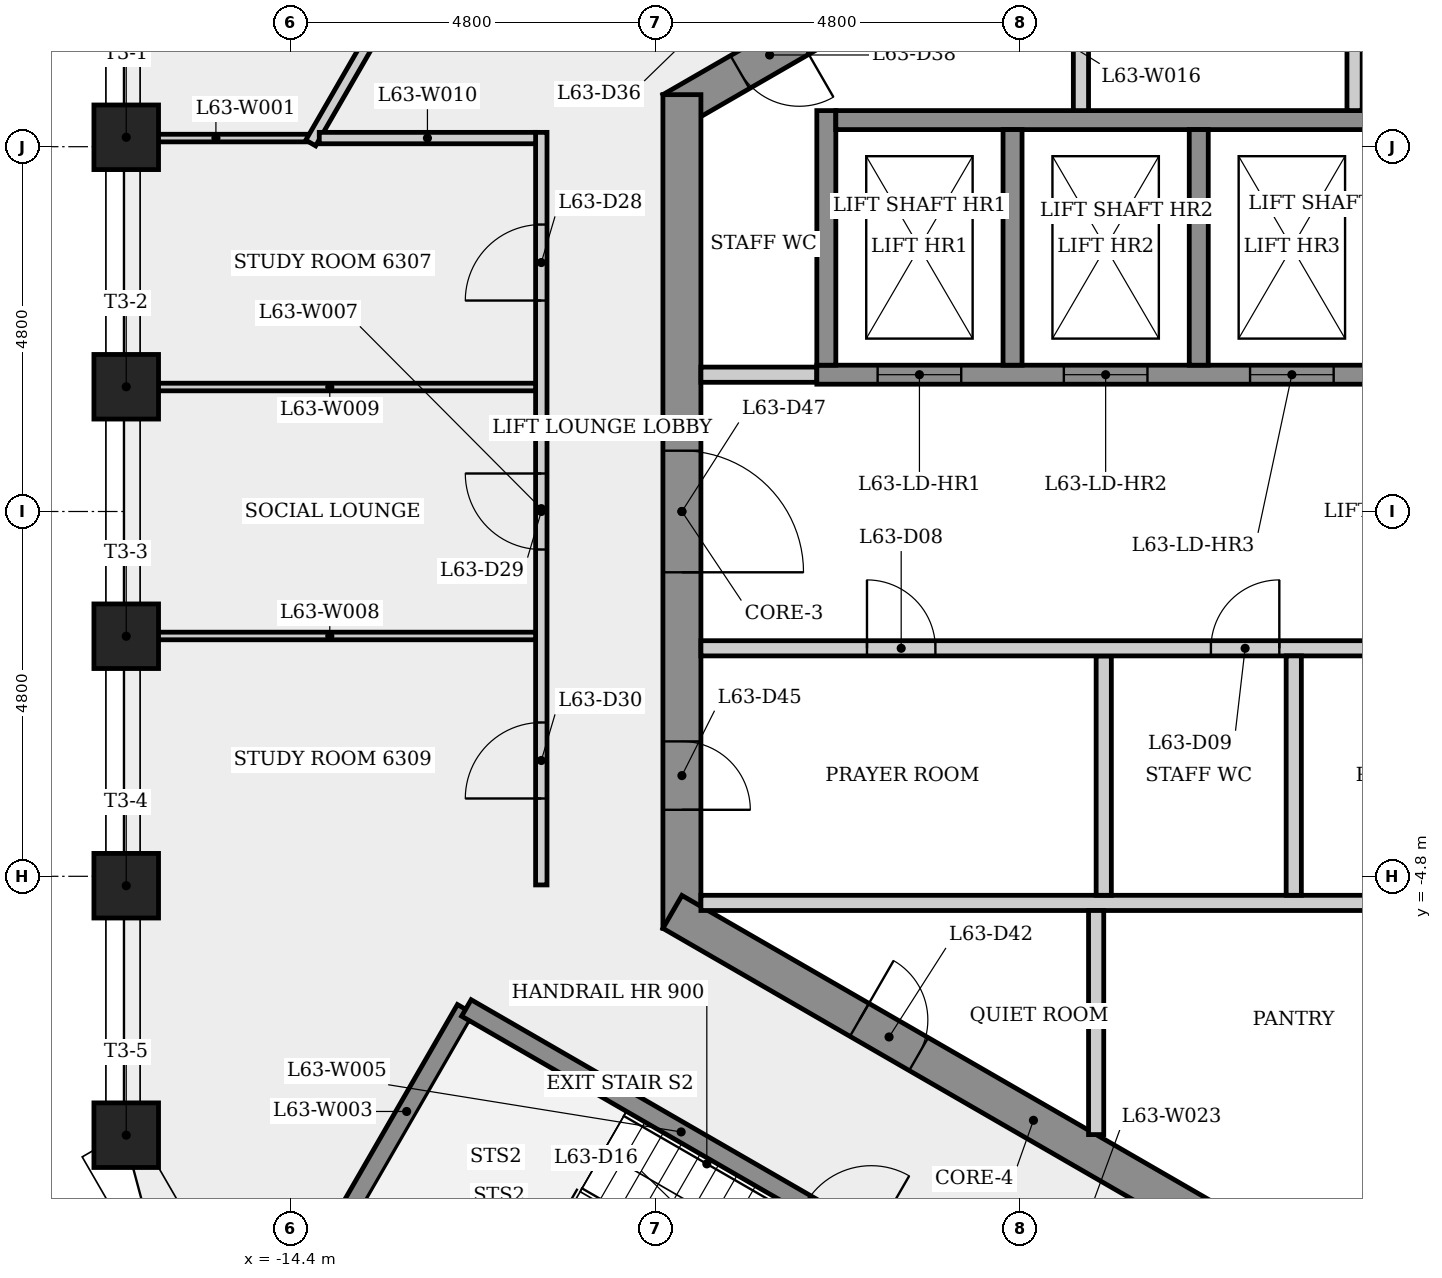
"""IFC4 building model, lengths in metres.
Left out: names, types, materials, properties, quantities, classifications, styles, units other than length and angle.
Written with IfcOpenShell. Run it as: python <this file> out.ifc"""

import sys

from ifc_helpers import new_model, si_unit, direction, frame, frame_2d, origin, origin_2d, place, context, subcontext, project, spatial, rectangle, extrude, element, fill, save


model = new_model("IFC4")
c1 = context("Model", 3, precision=1e-05, world=origin(), true_north=direction((0.0, 1.0)))
c2 = subcontext(c1, "Body", "Model", "MODEL_VIEW")
j1 = project(units=[si_unit("LENGTHUNIT", "METRE"), si_unit("PLANEANGLEUNIT", "RADIAN")], contexts=[c1])
p1 = place(None, origin())
s1 = spatial("IfcSite", under=j1, at=p1, CompositionType="ELEMENT")
p2 = place(p1, origin())
s2 = spatial("IfcBuilding", under=s1, at=p2, CompositionType="ELEMENT")
p3 = place(p2, frame((0.0, 0.0, 235.9)))
s3 = spatial("IfcBuildingStorey", under=s2, at=p3, CompositionType="ELEMENT", Elevation=235.9)
p4 = place(p3, frame((0.125, 10.753, 0.0), z_axis=(0.0, 0.0, 1.0), x_axis=(-0.866023993627, -0.500002442456, 0.0)))
e1 = element("IfcWall", 1, at=p4, inside=s3, PredefinedType="SHEAR", context=c2, shape_type="SweptSolid", body=[
    extrude(rectangle(XDim=10.97, YDim=0.5, at=frame_2d((5.485, 0.0))), origin(), (0.0, 0.0, 1.0), 3.4),
])
p5 = place(p4, frame((9.043, 0.0, 0.0)))
e2 = element("IfcOpeningElement", 2, at=p5, cuts=e1, PredefinedType="OPENING", context=c2, shape_type="SweptSolid", body=[
    extrude(rectangle(XDim=0.9, YDim=2.1, at=frame_2d((0.45, 1.05))), frame((0.0, 0.26, 0.0), z_axis=(0.0, -1.0, 0.0), x_axis=(1.0, 0.0, 0.0)), (0.0, 0.0, 1.0), 0.52),
])
p6 = place(p4, frame((2.38, 0.0, 0.0)))
e3 = element("IfcOpeningElement", 3, at=p6, cuts=e1, PredefinedType="OPENING", context=c2, shape_type="SweptSolid", body=[
    extrude(rectangle(XDim=0.9, YDim=2.1, at=frame_2d((0.45, 1.05))), frame((0.0, 0.26, 0.0), z_axis=(0.0, -1.0, 0.0), x_axis=(1.0, 0.0, 0.0)), (0.0, 0.0, 1.0), 0.52),
])
p7 = place(p3, frame((-9.25, 5.485, 0.0), z_axis=(0.0, 0.0, 1.0), x_axis=(0.0, -1.0, 0.0)))
e4 = element("IfcWall", 4, at=p7, inside=s3, PredefinedType="SHEAR", context=c2, shape_type="SweptSolid", body=[
    extrude(rectangle(XDim=10.97, YDim=0.5, at=frame_2d((5.485, 0.0))), origin(), (0.0, 0.0, 1.0), 3.4),
])
p8 = place(p7, frame((8.51, 0.0, 0.0)))
e5 = element("IfcOpeningElement", 5, at=p8, cuts=e4, PredefinedType="OPENING", context=c2, shape_type="SweptSolid", body=[
    extrude(rectangle(XDim=0.9, YDim=2.1, at=frame_2d((0.45, 1.05))), frame((0.0, 0.26, 0.0), z_axis=(0.0, -1.0, 0.0), x_axis=(1.0, 0.0, 0.0)), (0.0, 0.0, 1.0), 0.52),
])
p9 = place(p7, frame((4.685, 0.0, 0.0)))
e6 = element("IfcOpeningElement", 6, at=p9, cuts=e4, PredefinedType="OPENING", context=c2, shape_type="SweptSolid", body=[
    extrude(rectangle(XDim=1.6, YDim=2.1, at=frame_2d((0.8, 1.05))), frame((0.0, 0.26, 0.0), z_axis=(0.0, -1.0, 0.0), x_axis=(1.0, 0.0, 0.0)), (0.0, 0.0, 1.0), 0.52),
])
p10 = place(p3, frame((-9.375, -5.268, 0.0), z_axis=(0.0, 0.0, 1.0), x_axis=(0.866023993627, -0.500002442456, 0.0)))
e7 = element("IfcWall", 7, at=p10, inside=s3, PredefinedType="SHEAR", context=c2, shape_type="SweptSolid", body=[
    extrude(rectangle(XDim=10.97, YDim=0.5, at=frame_2d((5.485, 0.0))), origin(), (0.0, 0.0, 1.0), 3.4),
])
p11 = place(p10, frame((2.842, 0.0, 0.0)))
e8 = element("IfcOpeningElement", 8, at=p11, cuts=e7, PredefinedType="OPENING", context=c2, shape_type="SweptSolid", body=[
    extrude(rectangle(XDim=0.9, YDim=2.1, at=frame_2d((0.45, 1.05))), frame((0.0, 0.26, 0.0), z_axis=(0.0, -1.0, 0.0), x_axis=(1.0, 0.0, 0.0)), (0.0, 0.0, 1.0), 0.52),
])
for number, where, z_axis, x_axis in (
    (9, (-16.561, 4.924, 0.0), (0.0, 0.0, 1.0), (-1.0, 0.0, 0.0)),
    (10, (-16.561, 1.641, 0.0), (0.0, 0.0, 1.0), (-1.0, 0.0, 0.0)),
    (11, (-16.561, -1.641, 0.0), (0.0, 0.0, 1.0), (-1.0, 0.0, 0.0)),
    (12, (-16.561, -4.924, 0.0), (0.0, 0.0, 1.0), (-1.0, 0.0, 0.0)),
    (13, (-16.561, -8.206, 0.0), (0.0, 0.0, 1.0), (-1.0, 0.0, 0.0)),
):
    element("IfcColumn", number, at=place(p3, frame(where, z_axis=z_axis, x_axis=x_axis)), inside=s3, PredefinedType="COLUMN", context=c2, shape_type="SweptSolid", body=[
        extrude(rectangle(XDim=0.85, YDim=0.85, at=origin_2d()), origin(), (0.0, 0.0, 1.0), 3.4),
    ])
p12 = place(p3, frame((-14.171, 4.914, 0.0), z_axis=(0.0, 0.0, 1.0), x_axis=(-1.0, 0.0, 0.0)))
e14 = element("IfcWall", 14, at=p12, inside=s3, PredefinedType="PARTITIONING", context=c2, shape_type="SweptSolid", body=[
    extrude(rectangle(XDim=2.419, YDim=0.1, at=frame_2d((1.21, 0.0))), origin(), (0.0, 0.0, 1.0), 3.05),
])
p13 = place(p3, frame((-14.134, 4.849, 0.0), z_axis=(0.0, 0.0, 1.0), x_axis=(0.50000114319, 0.866024743763, 0.0)))
e15 = element("IfcWall", 15, at=p13, inside=s3, PredefinedType="PARTITIONING", context=c2, shape_type="SweptSolid", body=[
    extrude(rectangle(XDim=6.092, YDim=0.15, at=frame_2d((3.046, 0.0))), origin(), (0.0, 0.0, 1.0), 3.05),
])
p14 = place(p13, frame((2.546, 0.0, 0.0)))
e16 = element("IfcOpeningElement", 16, at=p14, cuts=e15, PredefinedType="OPENING", context=c2, shape_type="SweptSolid", body=[
    extrude(rectangle(XDim=1.0, YDim=2.1, at=frame_2d((0.5, 1.05))), frame((0.0, 0.085, 0.0), z_axis=(0.0, -1.0, 0.0), x_axis=(1.0, 0.0, 0.0)), (0.0, 0.0, 1.0), 0.17),
])
p15 = place(p3, frame((-13.648, -9.239, 0.0), z_axis=(0.0, 0.0, 1.0), x_axis=(0.500003782172, 0.866023220135, 0.0)))
e17 = element("IfcWall", 17, at=p15, inside=s3, PredefinedType="SHEAR", context=c2, shape_type="SweptSolid", body=[
    extrude(rectangle(XDim=3.105, YDim=0.25, at=frame_2d((1.552, 0.0))), origin(), (0.0, 0.0, 1.0), 3.05),
])
p16 = place(p3, frame((-12.085, -6.532, 0.0), z_axis=(0.0, 0.0, 1.0), x_axis=(0.866031063448, -0.499990197047, 0.0)))
e18 = element("IfcWall", 18, at=p16, inside=s3, PredefinedType="SHEAR", context=c2, shape_type="SweptSolid", body=[
    extrude(rectangle(XDim=6.525, YDim=0.25, at=frame_2d((3.263, 0.0))), origin(), (0.0, 0.0, 1.0), 3.05),
])
p17 = place(p16, frame((5.15, 0.0, 0.0)))
e19 = element("IfcOpeningElement", 19, at=p17, cuts=e18, PredefinedType="OPENING", context=c2, shape_type="SweptSolid", body=[
    extrude(rectangle(XDim=1.0, YDim=2.1, at=frame_2d((0.5, 1.05))), frame((0.0, 0.135, 0.0), z_axis=(0.0, -1.0, 0.0), x_axis=(1.0, 0.0, 0.0)), (0.0, 0.0, 1.0), 0.27),
])
p18 = place(p3, frame((-11.1, -4.914, 0.0), z_axis=(0.0, 0.0, 1.0), x_axis=(0.0, 1.0, 0.0)))
e20 = element("IfcWall", 20, at=p18, inside=s3, PredefinedType="PARTITIONING", context=c2, shape_type="SweptSolid", body=[
    extrude(rectangle(XDim=9.902, YDim=0.15, at=frame_2d((4.951, 0.0))), origin(), (0.0, 0.0, 1.0), 3.05),
])
p19 = place(p18, frame((7.689, 0.0, 0.0)))
e21 = element("IfcOpeningElement", 21, at=p19, cuts=e20, PredefinedType="OPENING", context=c2, shape_type="SweptSolid", body=[
    extrude(rectangle(XDim=1.0, YDim=2.1, at=frame_2d((0.5, 1.05))), frame((0.0, 0.085, 0.0), z_axis=(0.0, -1.0, 0.0), x_axis=(1.0, 0.0, 0.0)), (0.0, 0.0, 1.0), 0.17),
])
p20 = place(p18, frame((4.414, 0.0, 0.0)))
e22 = element("IfcOpeningElement", 22, at=p20, cuts=e20, PredefinedType="OPENING", context=c2, shape_type="SweptSolid", body=[
    extrude(rectangle(XDim=1.0, YDim=2.1, at=frame_2d((0.5, 1.05))), frame((0.0, 0.085, 0.0), z_axis=(0.0, -1.0, 0.0), x_axis=(1.0, 0.0, 0.0)), (0.0, 0.0, 1.0), 0.17),
])
p21 = place(p18, frame((1.137, 0.0, 0.0)))
e23 = element("IfcOpeningElement", 23, at=p21, cuts=e20, PredefinedType="OPENING", context=c2, shape_type="SweptSolid", body=[
    extrude(rectangle(XDim=1.0, YDim=2.1, at=frame_2d((0.5, 1.05))), frame((0.0, 0.085, 0.0), z_axis=(0.0, -1.0, 0.0), x_axis=(1.0, 0.0, 0.0)), (0.0, 0.0, 1.0), 0.17),
])
for number, where, z_axis, x_axis in (
    (24, (-11.175, -1.638, 0.0), (0.0, 0.0, 1.0), (-1.0, 0.0, 0.0)),
    (25, (-11.175, 1.638, 0.0), (0.0, 0.0, 1.0), (-1.0, 0.0, 0.0)),
):
    element("IfcWall", number, at=place(p3, frame(where, z_axis=z_axis, x_axis=x_axis)), inside=s3, PredefinedType="PARTITIONING", context=c2, shape_type="SweptSolid", body=[
        extrude(rectangle(XDim=5.416, YDim=0.1, at=frame_2d((2.708, 0.0))), origin(), (0.0, 0.0, 1.0), 3.05),
    ])
p22 = place(p3, frame((-11.175, 4.914, 0.0), z_axis=(0.0, 0.0, 1.0), x_axis=(-1.0, 0.0, 0.0)))
e26 = element("IfcWall", 26, at=p22, inside=s3, PredefinedType="PARTITIONING", context=c2, shape_type="SweptSolid", body=[
    extrude(rectangle(XDim=2.846, YDim=0.15, at=frame_2d((1.423, 0.0))), origin(), (0.0, 0.0, 1.0), 3.05),
])
p23 = place(p3, frame((-9.0, 1.8, 0.0), z_axis=(0.0, 0.0, 1.0), x_axis=(1.0, 0.0, 0.0)))
e27 = element("IfcWall", 27, at=p23, inside=s3, PredefinedType="PARTITIONING", context=c2, shape_type="SweptSolid", body=[
    extrude(rectangle(XDim=1.525, YDim=0.2, at=frame_2d((0.763, 0.0))), origin(), (0.0, 0.0, 1.0), 3.05),
])
p24 = place(p3, frame((-9.0, -5.15, 0.0), z_axis=(0.0, 0.0, 1.0), x_axis=(1.0, 0.0, 0.0)))
e28 = element("IfcWall", 28, at=p24, inside=s3, PredefinedType="PARTITIONING", context=c2, shape_type="SweptSolid", body=[
    extrude(rectangle(XDim=11.325, YDim=0.2, at=frame_2d((5.663, 0.0))), origin(), (0.0, 0.0, 1.0), 3.05),
])
p25 = place(p3, frame((-7.475, 1.8, 0.0), z_axis=(0.0, 0.0, 1.0), x_axis=(1.0, 0.0, 0.0)))
e29 = element("IfcWall", 29, at=p25, inside=s3, PredefinedType="SHEAR", context=c2, shape_type="SweptSolid", body=[
    extrude(rectangle(XDim=14.95, YDim=0.25, at=frame_2d((7.475, 0.0))), origin(), (0.0, 0.0, 1.0), 3.05),
])
p26 = place(p25, frame((0.8, 0.0, 0.0)))
e30 = element("IfcOpeningElement", 30, at=p26, cuts=e29, PredefinedType="OPENING", context=c2, shape_type="SweptSolid", body=[
    extrude(rectangle(XDim=1.1, YDim=2.1, at=frame_2d((0.55, 1.05))), frame((0.0, 0.135, 0.0), z_axis=(0.0, -1.0, 0.0), x_axis=(1.0, 0.0, 0.0)), (0.0, 0.0, 1.0), 0.27),
])
p27 = place(p25, frame((3.25, 0.0, 0.0)))
e31 = element("IfcOpeningElement", 31, at=p27, cuts=e29, PredefinedType="OPENING", context=c2, shape_type="SweptSolid", body=[
    extrude(rectangle(XDim=1.1, YDim=2.1, at=frame_2d((0.55, 1.05))), frame((0.0, 0.135, 0.0), z_axis=(0.0, -1.0, 0.0), x_axis=(1.0, 0.0, 0.0)), (0.0, 0.0, 1.0), 0.27),
])
p28 = place(p25, frame((5.7, 0.0, 0.0)))
e32 = element("IfcOpeningElement", 32, at=p28, cuts=e29, PredefinedType="OPENING", context=c2, shape_type="SweptSolid", body=[
    extrude(rectangle(XDim=1.1, YDim=2.1, at=frame_2d((0.55, 1.05))), frame((0.0, 0.135, 0.0), z_axis=(0.0, -1.0, 0.0), x_axis=(1.0, 0.0, 0.0)), (0.0, 0.0, 1.0), 0.27),
])
p29 = place(p25, frame((8.15, 0.0, 0.0)))
e33 = element("IfcOpeningElement", 33, at=p29, cuts=e29, PredefinedType="OPENING", context=c2, shape_type="SweptSolid", body=[
    extrude(rectangle(XDim=1.1, YDim=2.1, at=frame_2d((0.55, 1.05))), frame((0.0, 0.135, 0.0), z_axis=(0.0, -1.0, 0.0), x_axis=(1.0, 0.0, 0.0)), (0.0, 0.0, 1.0), 0.27),
])
p30 = place(p25, frame((10.6, 0.0, 0.0)))
e34 = element("IfcOpeningElement", 34, at=p30, cuts=e29, PredefinedType="OPENING", context=c2, shape_type="SweptSolid", body=[
    extrude(rectangle(XDim=1.1, YDim=2.1, at=frame_2d((0.55, 1.05))), frame((0.0, 0.135, 0.0), z_axis=(0.0, -1.0, 0.0), x_axis=(1.0, 0.0, 0.0)), (0.0, 0.0, 1.0), 0.27),
])
p31 = place(p25, frame((13.05, 0.0, 0.0)))
e35 = element("IfcOpeningElement", 35, at=p31, cuts=e29, PredefinedType="OPENING", context=c2, shape_type="SweptSolid", body=[
    extrude(rectangle(XDim=1.1, YDim=2.1, at=frame_2d((0.55, 1.05))), frame((0.0, 0.135, 0.0), z_axis=(0.0, -1.0, 0.0), x_axis=(1.0, 0.0, 0.0)), (0.0, 0.0, 1.0), 0.27),
])
p32 = place(p3, frame((-7.35, 1.925, 0.0), z_axis=(0.0, 0.0, 1.0), x_axis=(0.0, 1.0, 0.0)))
e36 = element("IfcWall", 36, at=p32, inside=s3, PredefinedType="SHEAR", context=c2, shape_type="SweptSolid", body=[
    extrude(rectangle(XDim=3.35, YDim=0.25, at=frame_2d((1.675, 0.0))), origin(), (0.0, 0.0, 1.0), 3.05),
])
p33 = place(p3, frame((-7.225, 5.15, 0.0), z_axis=(0.0, 0.0, 1.0), x_axis=(1.0, 0.0, 0.0)))
e37 = element("IfcWall", 37, at=p33, inside=s3, PredefinedType="SHEAR", context=c2, shape_type="SweptSolid", body=[
    extrude(rectangle(XDim=14.7, YDim=0.25, at=frame_2d((7.35, 0.0))), origin(), (0.0, 0.0, 1.0), 3.05),
])
p34 = place(p3, frame((-4.9, 5.025, 0.0), z_axis=(0.0, 0.0, 1.0), x_axis=(0.0, -1.0, 0.0)))
e38 = element("IfcWall", 38, at=p34, inside=s3, PredefinedType="SHEAR", context=c2, shape_type="SweptSolid", body=[
    extrude(rectangle(XDim=3.1, YDim=0.25, at=frame_2d((1.55, 0.0))), origin(), (0.0, 0.0, 1.0), 3.4),
])
p35 = place(p3, frame((-4.0, 8.083, 0.0), z_axis=(0.0, 0.0, 1.0), x_axis=(0.0, -1.0, 0.0)))
e39 = element("IfcWall", 39, at=p35, inside=s3, PredefinedType="PARTITIONING", context=c2, shape_type="SweptSolid", body=[
    extrude(rectangle(XDim=2.808, YDim=0.2, at=frame_2d((1.404, 0.0))), origin(), (0.0, 0.0, 1.0), 3.05),
])
p36 = place(p3, frame((-3.8, -5.25, 0.0), z_axis=(0.0, 0.0, 1.0), x_axis=(0.0, -1.0, 0.0)))
e40 = element("IfcWall", 40, at=p36, inside=s3, PredefinedType="PARTITIONING", context=c2, shape_type="SweptSolid", body=[
    extrude(rectangle(XDim=2.948, YDim=0.2, at=frame_2d((1.474, 0.0))), origin(), (0.0, 0.0, 1.0), 3.05),
])
p37 = place(p3, frame((-3.7, -1.9, 0.0), z_axis=(0.0, 0.0, 1.0), x_axis=(0.0, -1.0, 0.0)))
e41 = element("IfcWall", 41, at=p37, inside=s3, PredefinedType="PARTITIONING", context=c2, shape_type="SweptSolid", body=[
    extrude(rectangle(XDim=3.15, YDim=0.2, at=frame_2d((1.575, 0.0))), origin(), (0.0, 0.0, 1.0), 3.05),
])
p38 = place(p3, frame((-9.0, -1.8, 0.0), z_axis=(0.0, 0.0, 1.0), x_axis=(1.0, 0.0, 0.0)))
e42 = element("IfcWall", 42, at=p38, inside=s3, PredefinedType="PARTITIONING", context=c2, shape_type="SweptSolid", body=[
    extrude(rectangle(XDim=11.325, YDim=0.2, at=frame_2d((5.663, 0.0))), origin(), (0.0, 0.0, 1.0), 3.05),
])
p39 = place(p38, frame((2.185, 0.0, 0.0)))
e43 = element("IfcOpeningElement", 43, at=p39, cuts=e42, PredefinedType="OPENING", context=c2, shape_type="SweptSolid", body=[
    extrude(rectangle(XDim=0.9, YDim=2.1, at=frame_2d((0.45, 1.05))), frame((0.0, 0.11, 0.0), z_axis=(0.0, -1.0, 0.0), x_axis=(1.0, 0.0, 0.0)), (0.0, 0.0, 1.0), 0.22),
])
p40 = place(p38, frame((6.71, 0.0, 0.0)))
e44 = element("IfcOpeningElement", 44, at=p40, cuts=e42, PredefinedType="OPENING", context=c2, shape_type="SweptSolid", body=[
    extrude(rectangle(XDim=0.9, YDim=2.1, at=frame_2d((0.45, 1.05))), frame((0.0, 0.11, 0.0), z_axis=(0.0, -1.0, 0.0), x_axis=(1.0, 0.0, 0.0)), (0.0, 0.0, 1.0), 0.22),
])
p41 = place(p38, frame((9.713, 0.0, 0.0)))
e45 = element("IfcOpeningElement", 45, at=p41, cuts=e42, PredefinedType="OPENING", context=c2, shape_type="SweptSolid", body=[
    extrude(rectangle(XDim=0.9, YDim=2.1, at=frame_2d((0.45, 1.05))), frame((0.0, 0.11, 0.0), z_axis=(0.0, -1.0, 0.0), x_axis=(1.0, 0.0, 0.0)), (0.0, 0.0, 1.0), 0.22),
])
p42 = place(p3, frame((-2.45, 5.025, 0.0), z_axis=(0.0, 0.0, 1.0), x_axis=(0.0, -1.0, 0.0)))
e46 = element("IfcWall", 46, at=p42, inside=s3, PredefinedType="SHEAR", context=c2, shape_type="SweptSolid", body=[
    extrude(rectangle(XDim=3.1, YDim=0.25, at=frame_2d((1.55, 0.0))), origin(), (0.0, 0.0, 1.0), 3.4),
])
p43 = place(p3, frame((-1.2, -1.9, 0.0), z_axis=(0.0, 0.0, 1.0), x_axis=(0.0, -1.0, 0.0)))
e47 = element("IfcWall", 47, at=p43, inside=s3, PredefinedType="PARTITIONING", context=c2, shape_type="SweptSolid", body=[
    extrude(rectangle(XDim=3.15, YDim=0.2, at=frame_2d((1.575, 0.0))), origin(), (0.0, 0.0, 1.0), 3.05),
])
p44 = place(p3, frame((-0.4, 10.161, 0.0), z_axis=(0.0, 0.0, 1.0), x_axis=(0.0, -1.0, 0.0)))
e48 = element("IfcWall", 48, at=p44, inside=s3, PredefinedType="PARTITIONING", context=c2, shape_type="SweptSolid", body=[
    extrude(rectangle(XDim=4.886, YDim=0.2, at=frame_2d((2.443, 0.0))), origin(), (0.0, 0.0, 1.0), 3.05),
])
p45 = place(p26, origin())
e49 = element("IfcDoor", 49, at=p45, inside=s3, OperationType="SLIDING_TO_LEFT", PredefinedType="DOOR", context=c2, shape_type="SweptSolid", body=[
    extrude(rectangle(XDim=1.1, YDim=2.1, at=frame_2d((0.55, 1.05))), frame((0.0, 0.025, 0.0), z_axis=(0.0, -1.0, 0.0), x_axis=(1.0, 0.0, 0.0)), (0.0, 0.0, 1.0), 0.05),
])
fill(e30, e49)
p46 = place(p27, origin())
e50 = element("IfcDoor", 50, at=p46, inside=s3, OperationType="SLIDING_TO_LEFT", PredefinedType="DOOR", context=c2, shape_type="SweptSolid", body=[
    extrude(rectangle(XDim=1.1, YDim=2.1, at=frame_2d((0.55, 1.05))), frame((0.0, 0.025, 0.0), z_axis=(0.0, -1.0, 0.0), x_axis=(1.0, 0.0, 0.0)), (0.0, 0.0, 1.0), 0.05),
])
fill(e31, e50)
p47 = place(p28, origin())
e51 = element("IfcDoor", 51, at=p47, inside=s3, OperationType="SLIDING_TO_LEFT", PredefinedType="DOOR", context=c2, shape_type="SweptSolid", body=[
    extrude(rectangle(XDim=1.1, YDim=2.1, at=frame_2d((0.55, 1.05))), frame((0.0, 0.025, 0.0), z_axis=(0.0, -1.0, 0.0), x_axis=(1.0, 0.0, 0.0)), (0.0, 0.0, 1.0), 0.05),
])
fill(e32, e51)
p48 = place(p39, origin())
e52 = element("IfcDoor", 52, at=p48, inside=s3, OperationType="SINGLE_SWING_LEFT", PredefinedType="DOOR", context=c2, shape_type="SweptSolid", body=[
    extrude(rectangle(XDim=0.9, YDim=2.1, at=frame_2d((0.45, 1.05))), frame((0.0, 0.025, 0.0), z_axis=(0.0, -1.0, 0.0), x_axis=(1.0, 0.0, 0.0)), (0.0, 0.0, 1.0), 0.05),
])
fill(e43, e52)
p49 = place(p40, origin())
e53 = element("IfcDoor", 53, at=p49, inside=s3, OperationType="SINGLE_SWING_RIGHT", PredefinedType="DOOR", context=c2, shape_type="SweptSolid", body=[
    extrude(rectangle(XDim=0.9, YDim=2.1, at=frame_2d((0.45, 1.05))), frame((0.0, 0.025, 0.0), z_axis=(0.0, -1.0, 0.0), x_axis=(1.0, 0.0, 0.0)), (0.0, 0.0, 1.0), 0.05),
])
fill(e44, e53)
p50 = place(p19, origin())
e54 = element("IfcDoor", 54, at=p50, inside=s3, OperationType="SINGLE_SWING_LEFT", PredefinedType="DOOR", context=c2, shape_type="SweptSolid", body=[
    extrude(rectangle(XDim=1.0, YDim=2.1, at=frame_2d((0.5, 1.05))), frame((0.0, 0.025, 0.0), z_axis=(0.0, -1.0, 0.0), x_axis=(1.0, 0.0, 0.0)), (0.0, 0.0, 1.0), 0.05),
])
fill(e21, e54)
p51 = place(p20, origin())
e55 = element("IfcDoor", 55, at=p51, inside=s3, OperationType="SINGLE_SWING_RIGHT", PredefinedType="DOOR", context=c2, shape_type="SweptSolid", body=[
    extrude(rectangle(XDim=1.0, YDim=2.1, at=frame_2d((0.5, 1.05))), frame((0.0, 0.025, 0.0), z_axis=(0.0, -1.0, 0.0), x_axis=(1.0, 0.0, 0.0)), (0.0, 0.0, 1.0), 0.05),
])
fill(e22, e55)
p52 = place(p21, origin())
e56 = element("IfcDoor", 56, at=p52, inside=s3, OperationType="SINGLE_SWING_LEFT", PredefinedType="DOOR", context=c2, shape_type="SweptSolid", body=[
    extrude(rectangle(XDim=1.0, YDim=2.1, at=frame_2d((0.5, 1.05))), frame((0.0, 0.025, 0.0), z_axis=(0.0, -1.0, 0.0), x_axis=(1.0, 0.0, 0.0)), (0.0, 0.0, 1.0), 0.05),
])
fill(e23, e56)
p53 = place(p5, origin())
e57 = element("IfcDoor", 57, at=p53, inside=s3, OperationType="SINGLE_SWING_LEFT", PredefinedType="DOOR", context=c2, shape_type="SweptSolid", body=[
    extrude(rectangle(XDim=0.9, YDim=2.1, at=frame_2d((0.45, 1.05))), frame((0.0, 0.025, 0.0), z_axis=(0.0, -1.0, 0.0), x_axis=(1.0, 0.0, 0.0)), (0.0, 0.0, 1.0), 0.05),
])
fill(e2, e57)
p54 = place(p11, origin())
e58 = element("IfcDoor", 58, at=p54, inside=s3, OperationType="SINGLE_SWING_LEFT", PredefinedType="DOOR", context=c2, shape_type="SweptSolid", body=[
    extrude(rectangle(XDim=0.9, YDim=2.1, at=frame_2d((0.45, 1.05))), frame((0.0, 0.025, 0.0), z_axis=(0.0, -1.0, 0.0), x_axis=(1.0, 0.0, 0.0)), (0.0, 0.0, 1.0), 0.05),
])
fill(e8, e58)
p55 = place(p8, origin())
e59 = element("IfcDoor", 59, at=p55, inside=s3, OperationType="SINGLE_SWING_RIGHT", PredefinedType="DOOR", context=c2, shape_type="SweptSolid", body=[
    extrude(rectangle(XDim=0.9, YDim=2.1, at=frame_2d((0.45, 1.05))), frame((0.0, 0.025, 0.0), z_axis=(0.0, -1.0, 0.0), x_axis=(1.0, 0.0, 0.0)), (0.0, 0.0, 1.0), 0.05),
])
fill(e5, e59)
p56 = place(p9, origin())
e60 = element("IfcDoor", 60, at=p56, inside=s3, OperationType="SINGLE_SWING_RIGHT", PredefinedType="DOOR", context=c2, shape_type="SweptSolid", body=[
    extrude(rectangle(XDim=1.6, YDim=2.1, at=frame_2d((0.8, 1.05))), frame((0.0, 0.025, 0.0), z_axis=(0.0, -1.0, 0.0), x_axis=(1.0, 0.0, 0.0)), (0.0, 0.0, 1.0), 0.05),
])
fill(e6, e60)
save(model, sys.argv[1])
